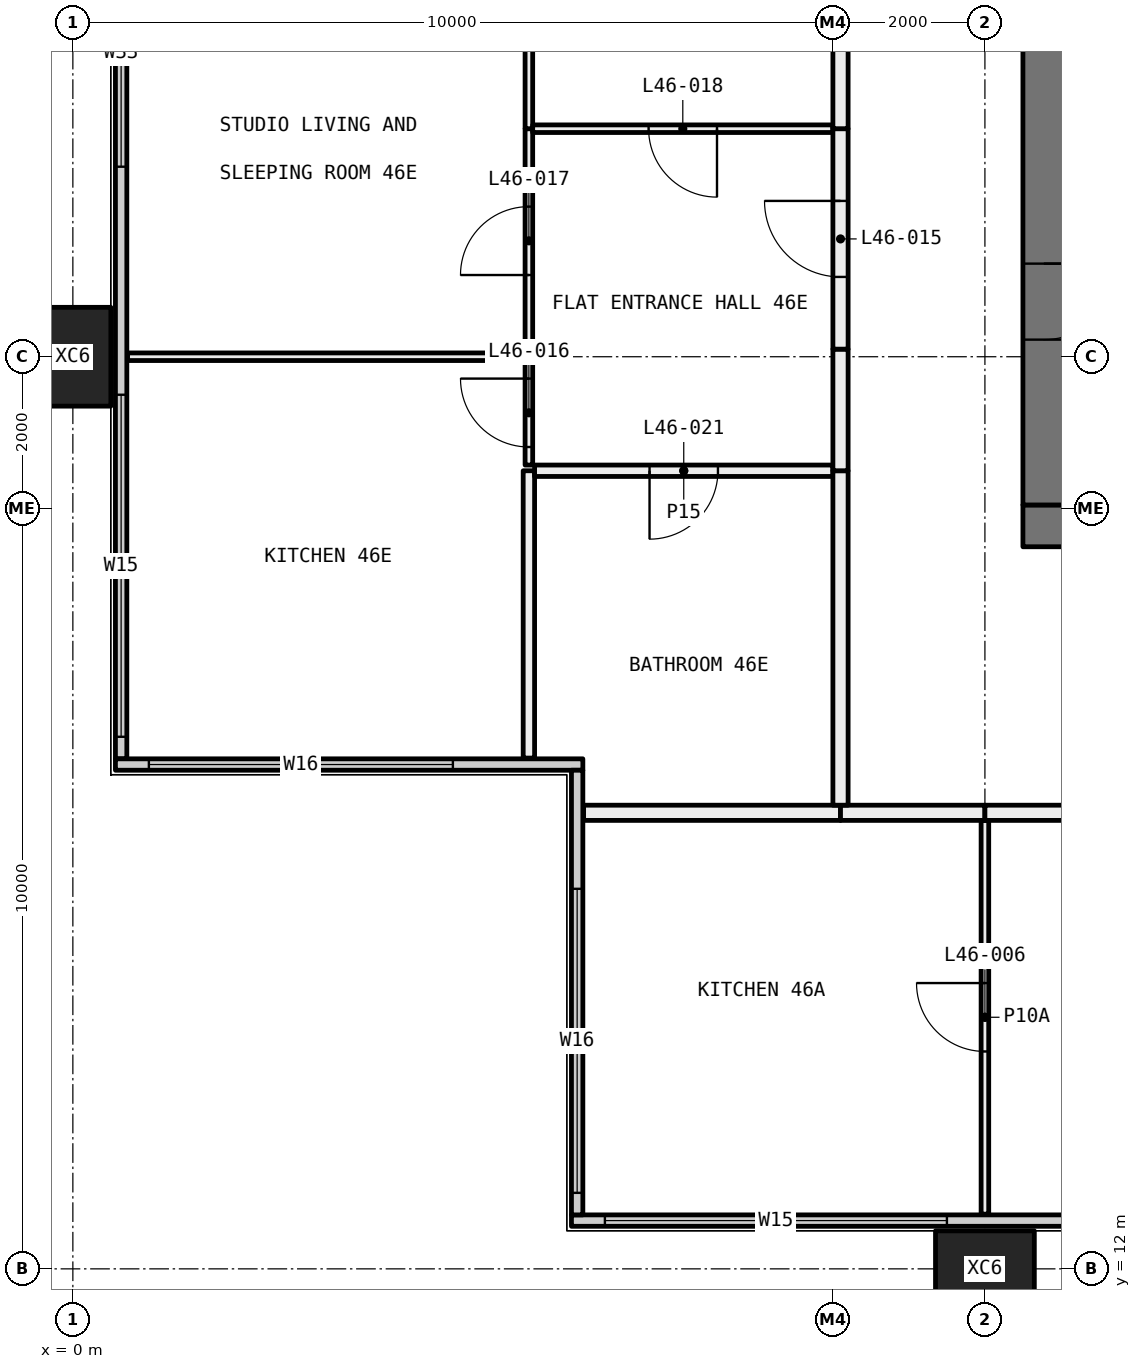
"""IFC4 building model, lengths in metres.
Left out: names, types, materials, properties, quantities, classifications, styles, units other than length and angle.
Written with IfcOpenShell. Run it as: python <this file> out.ifc"""

import sys

from ifc_helpers import new_model, si_unit, direction, frame, frame_2d, origin, origin_2d, place, context, subcontext, project, spatial, rectangle, hollow_rectangle, extrude, element, fill, save


model = new_model("IFC4")
c1 = context("Model", 3, precision=1e-05, world=origin(), true_north=direction((0.0, 1.0)))
c2 = subcontext(c1, "Body", "Model", "MODEL_VIEW")
j1 = project(units=[si_unit("LENGTHUNIT", "METRE"), si_unit("PLANEANGLEUNIT", "RADIAN")], contexts=[c1])
p1 = place(None, origin())
s1 = spatial("IfcSite", under=j1, at=p1, CompositionType="ELEMENT")
p2 = place(p1, origin())
s2 = spatial("IfcBuilding", under=s1, at=p2, CompositionType="ELEMENT")
p3 = place(p2, frame((0.0, 0.0, 175.5)))
s3 = spatial("IfcBuildingStorey", under=s2, at=p3, CompositionType="ELEMENT", Elevation=175.5)
for number, where, z_axis, x_axis in (
    (1, (0.0, 24.0, -0.4), (0.0, 0.0, 1.0), (0.0, 1.0, 0.0)),
    (2, (12.0, 12.0, -0.4), (0.0, 0.0, 1.0), (1.0, 0.0, 0.0)),
):
    element("IfcColumn", number, at=place(p3, frame(where, z_axis=z_axis, x_axis=x_axis)), inside=s3, PredefinedType="COLUMN", context=c2, shape_type="SweptSolid", body=[
        extrude(hollow_rectangle(XDim=1.3, YDim=1.0, WallThickness=0.05, at=origin_2d()), origin(), (0.0, 0.0, 1.0), 3.45),
    ])
p4 = place(p3, frame((6.56, 12.635, 0.0), z_axis=(0.0, 0.0, 1.0), x_axis=(1.0, 0.0, 0.0)))
e3 = element("IfcWall", 3, at=p4, inside=s3, PredefinedType="ELEMENTEDWALL", context=c2, shape_type="SweptSolid", body=[
    extrude(rectangle(XDim=46.88, YDim=0.15, at=frame_2d((23.44, 0.0))), origin(), (0.0, 0.0, 1.0), 3.05),
])
p5 = place(p4, frame((0.44, 0.0, 0.45)))
e4 = element("IfcOpeningElement", 4, at=p5, cuts=e3, PredefinedType="OPENING", context=c2, shape_type="SweptSolid", body=[
    extrude(rectangle(XDim=4.5, YDim=2.55, at=frame_2d((2.25, 1.275))), frame((0.0, 0.085, 0.0), z_axis=(0.0, -1.0, 0.0), x_axis=(1.0, 0.0, 0.0)), (0.0, 0.0, 1.0), 0.17),
])
p6 = place(p4, frame((7.94, 0.0, 0.45)))
e5 = element("IfcOpeningElement", 5, at=p6, cuts=e3, PredefinedType="OPENING", context=c2, shape_type="SweptSolid", body=[
    extrude(rectangle(XDim=3.0, YDim=2.55, at=frame_2d((1.5, 1.275))), frame((0.0, 0.085, 0.0), z_axis=(0.0, -1.0, 0.0), x_axis=(1.0, 0.0, 0.0)), (0.0, 0.0, 1.0), 0.17),
])
p7 = place(p4, frame((11.94, 0.0, 0.45)))
e6 = element("IfcOpeningElement", 6, at=p7, cuts=e3, PredefinedType="OPENING", context=c2, shape_type="SweptSolid", body=[
    extrude(rectangle(XDim=3.0, YDim=2.55, at=frame_2d((1.5, 1.275))), frame((0.0, 0.085, 0.0), z_axis=(0.0, -1.0, 0.0), x_axis=(1.0, 0.0, 0.0)), (0.0, 0.0, 1.0), 0.17),
])
p8 = place(p4, frame((19.94, 0.0, 0.45)))
e7 = element("IfcOpeningElement", 7, at=p8, cuts=e3, PredefinedType="OPENING", context=c2, shape_type="SweptSolid", body=[
    extrude(rectangle(XDim=3.0, YDim=2.55, at=frame_2d((1.5, 1.275))), frame((0.0, 0.085, 0.0), z_axis=(0.0, -1.0, 0.0), x_axis=(1.0, 0.0, 0.0)), (0.0, 0.0, 1.0), 0.17),
])
p9 = place(p4, frame((23.94, 0.0, 0.45)))
e8 = element("IfcOpeningElement", 8, at=p9, cuts=e3, PredefinedType="OPENING", context=c2, shape_type="SweptSolid", body=[
    extrude(rectangle(XDim=2.0, YDim=2.55, at=frame_2d((1.0, 1.275))), frame((0.0, 0.085, 0.0), z_axis=(0.0, -1.0, 0.0), x_axis=(1.0, 0.0, 0.0)), (0.0, 0.0, 1.0), 0.17),
])
p10 = place(p4, frame((31.94, 0.0, 0.45)))
e9 = element("IfcOpeningElement", 9, at=p10, cuts=e3, PredefinedType="OPENING", context=c2, shape_type="SweptSolid", body=[
    extrude(rectangle(XDim=3.0, YDim=2.55, at=frame_2d((1.5, 1.275))), frame((0.0, 0.085, 0.0), z_axis=(0.0, -1.0, 0.0), x_axis=(1.0, 0.0, 0.0)), (0.0, 0.0, 1.0), 0.17),
])
p11 = place(p4, frame((35.94, 0.0, 0.45)))
e10 = element("IfcOpeningElement", 10, at=p11, cuts=e3, PredefinedType="OPENING", context=c2, shape_type="SweptSolid", body=[
    extrude(rectangle(XDim=3.0, YDim=2.55, at=frame_2d((1.5, 1.275))), frame((0.0, 0.085, 0.0), z_axis=(0.0, -1.0, 0.0), x_axis=(1.0, 0.0, 0.0)), (0.0, 0.0, 1.0), 0.17),
])
p12 = place(p4, frame((41.94, 0.0, 0.45)))
e11 = element("IfcOpeningElement", 11, at=p12, cuts=e3, PredefinedType="OPENING", context=c2, shape_type="SweptSolid", body=[
    extrude(rectangle(XDim=4.5, YDim=2.55, at=frame_2d((2.25, 1.275))), frame((0.0, 0.085, 0.0), z_axis=(0.0, -1.0, 0.0), x_axis=(1.0, 0.0, 0.0)), (0.0, 0.0, 1.0), 0.17),
])
p13 = place(p3, frame((0.635, 18.71, 0.0), z_axis=(0.0, 0.0, 1.0), x_axis=(0.0, 1.0, 0.0)))
e12 = element("IfcWall", 12, at=p13, inside=s3, PredefinedType="ELEMENTEDWALL", context=c2, shape_type="SweptSolid", body=[
    extrude(rectangle(XDim=22.58, YDim=0.15, at=frame_2d((11.29, 0.0))), origin(), (0.0, 0.0, 1.0), 3.05),
])
p14 = place(p13, frame((0.29, 0.0, 0.45)))
e13 = element("IfcOpeningElement", 13, at=p14, cuts=e12, PredefinedType="OPENING", context=c2, shape_type="SweptSolid", body=[
    extrude(rectangle(XDim=4.5, YDim=2.55, at=frame_2d((2.25, 1.275))), frame((0.0, 0.085, 0.0), z_axis=(0.0, -1.0, 0.0), x_axis=(1.0, 0.0, 0.0)), (0.0, 0.0, 1.0), 0.17),
])
p15 = place(p13, frame((7.79, 0.0, 0.45)))
e14 = element("IfcOpeningElement", 14, at=p15, cuts=e12, PredefinedType="OPENING", context=c2, shape_type="SweptSolid", body=[
    extrude(rectangle(XDim=3.0, YDim=2.55, at=frame_2d((1.5, 1.275))), frame((0.0, 0.085, 0.0), z_axis=(0.0, -1.0, 0.0), x_axis=(1.0, 0.0, 0.0)), (0.0, 0.0, 1.0), 0.17),
])
p16 = place(p13, frame((11.79, 0.0, 0.45)))
e15 = element("IfcOpeningElement", 15, at=p16, cuts=e12, PredefinedType="OPENING", context=c2, shape_type="SweptSolid", body=[
    extrude(rectangle(XDim=2.0, YDim=2.55, at=frame_2d((1.0, 1.275))), frame((0.0, 0.085, 0.0), z_axis=(0.0, -1.0, 0.0), x_axis=(1.0, 0.0, 0.0)), (0.0, 0.0, 1.0), 0.17),
])
p17 = place(p13, frame((17.79, 0.0, 0.45)))
e16 = element("IfcOpeningElement", 16, at=p17, cuts=e12, PredefinedType="OPENING", context=c2, shape_type="SweptSolid", body=[
    extrude(rectangle(XDim=4.5, YDim=2.55, at=frame_2d((2.25, 1.275))), frame((0.0, 0.085, 0.0), z_axis=(0.0, -1.0, 0.0), x_axis=(1.0, 0.0, 0.0)), (0.0, 0.0, 1.0), 0.17),
])
p18 = place(p3, frame((0.56, 18.635, 0.0), z_axis=(0.0, 0.0, 1.0), x_axis=(1.0, 0.0, 0.0)))
e17 = element("IfcWall", 17, at=p18, inside=s3, PredefinedType="ELEMENTEDWALL", context=c2, shape_type="SweptSolid", body=[
    extrude(rectangle(XDim=6.15, YDim=0.15, at=frame_2d((3.075, 0.0))), origin(), (0.0, 0.0, 1.0), 3.05),
])
p19 = place(p18, frame((0.44, 0.0, 0.45)))
e18 = element("IfcOpeningElement", 18, at=p19, cuts=e17, PredefinedType="OPENING", context=c2, shape_type="SweptSolid", body=[
    extrude(rectangle(XDim=4.0, YDim=2.55, at=frame_2d((2.0, 1.275))), frame((0.0, 0.085, 0.0), z_axis=(0.0, -1.0, 0.0), x_axis=(1.0, 0.0, 0.0)), (0.0, 0.0, 1.0), 0.17),
])
p20 = place(p3, frame((6.635, 12.71, 0.0), z_axis=(0.0, 0.0, 1.0), x_axis=(0.0, 1.0, 0.0)))
e19 = element("IfcWall", 19, at=p20, inside=s3, PredefinedType="ELEMENTEDWALL", context=c2, shape_type="SweptSolid", body=[
    extrude(rectangle(XDim=5.85, YDim=0.15, at=frame_2d((2.925, 0.0))), origin(), (0.0, 0.0, 1.0), 3.05),
])
p21 = place(p20, frame((0.29, 0.0, 0.45)))
e20 = element("IfcOpeningElement", 20, at=p21, cuts=e19, PredefinedType="OPENING", context=c2, shape_type="SweptSolid", body=[
    extrude(rectangle(XDim=4.0, YDim=2.55, at=frame_2d((2.0, 1.275))), frame((0.0, 0.085, 0.0), z_axis=(0.0, -1.0, 0.0), x_axis=(1.0, 0.0, 0.0)), (0.0, 0.0, 1.0), 0.17),
])
p22 = place(p3, frame((12.0, 12.72, 0.0), z_axis=(0.0, 0.0, 1.0), x_axis=(0.0, 1.0, 0.0)))
e21 = element("IfcWall", 21, at=p22, inside=s3, PredefinedType="PARTITIONING", context=c2, shape_type="SweptSolid", body=[
    extrude(rectangle(XDim=5.18, YDim=0.1, at=frame_2d((2.59, 0.0))), origin(), (0.0, 0.0, 1.0), 3.05),
])
p23 = place(p22, frame((2.14, 0.0, 0.0)))
e22 = element("IfcOpeningElement", 22, at=p23, cuts=e21, PredefinedType="OPENING", context=c2, shape_type="SweptSolid", body=[
    extrude(rectangle(XDim=0.9, YDim=2.1, at=frame_2d((0.45, 1.05))), frame((0.0, 0.06, 0.0), z_axis=(0.0, -1.0, 0.0), x_axis=(1.0, 0.0, 0.0)), (0.0, 0.0, 1.0), 0.12),
])
p24 = place(p3, frame((10.1, 18.0, 0.0), z_axis=(0.0, 0.0, 1.0), x_axis=(-1.0, 0.0, 0.0)))
e23 = element("IfcWall", 23, at=p24, inside=s3, PredefinedType="PARTITIONING", context=c2, shape_type="SweptSolid", body=[
    extrude(rectangle(XDim=3.38, YDim=0.2, at=frame_2d((1.69, 0.0))), origin(), (0.0, 0.0, 1.0), 3.05),
])
p25 = place(p3, frame((12.0, 18.0, 0.0), z_axis=(0.0, 0.0, 1.0), x_axis=(-1.0, 0.0, 0.0)))
e24 = element("IfcWall", 24, at=p25, inside=s3, PredefinedType="PARTITIONING", context=c2, shape_type="SweptSolid", body=[
    extrude(rectangle(XDim=1.9, YDim=0.2, at=frame_2d((0.95, 0.0))), origin(), (0.0, 0.0, 1.0), 3.05),
])
p26 = place(p3, frame((18.0, 18.0, 0.0), z_axis=(0.0, 0.0, 1.0), x_axis=(-1.0, 0.0, 0.0)))
e25 = element("IfcWall", 25, at=p26, inside=s3, PredefinedType="PARTITIONING", context=c2, shape_type="SweptSolid", body=[
    extrude(rectangle(XDim=6.0, YDim=0.2, at=frame_2d((3.0, 0.0))), origin(), (0.0, 0.0, 1.0), 3.05),
])
p27 = place(p3, frame((6.0, 24.0, 0.0), z_axis=(0.0, 0.0, 1.0), x_axis=(-1.0, 0.0, 0.0)))
e26 = element("IfcWall", 26, at=p27, inside=s3, PredefinedType="PARTITIONING", context=c2, shape_type="SweptSolid", body=[
    extrude(rectangle(XDim=5.28, YDim=0.1, at=frame_2d((2.64, 0.0))), origin(), (0.0, 0.0, 1.0), 2.45),
])
p28 = place(p3, frame((6.0, 18.72, 0.0), z_axis=(0.0, 0.0, 1.0), x_axis=(0.0, 1.0, 0.0)))
e27 = element("IfcWall", 27, at=p28, inside=s3, PredefinedType="PARTITIONING", context=c2, shape_type="SweptSolid", body=[
    extrude(rectangle(XDim=3.78, YDim=0.15, at=frame_2d((1.89, 0.0))), origin(), (0.0, 0.0, 1.0), 3.05),
])
p29 = place(p3, frame((6.0, 22.575, 0.0), z_axis=(0.0, 0.0, 1.0), x_axis=(0.0, 1.0, 0.0)))
e28 = element("IfcWall", 28, at=p29, inside=s3, PredefinedType="PARTITIONING", context=c2, shape_type="SweptSolid", body=[
    extrude(rectangle(XDim=1.375, YDim=0.1, at=frame_2d((0.688, 0.0))), origin(), (0.0, 0.0, 1.0), 2.45),
])
p30 = place(p29, frame((0.238, 0.0, 0.0)))
e29 = element("IfcOpeningElement", 29, at=p30, cuts=e28, PredefinedType="OPENING", context=c2, shape_type="SweptSolid", body=[
    extrude(rectangle(XDim=0.9, YDim=2.1, at=frame_2d((0.45, 1.05))), frame((0.0, 0.06, 0.0), z_axis=(0.0, -1.0, 0.0), x_axis=(1.0, 0.0, 0.0)), (0.0, 0.0, 1.0), 0.12),
])
p31 = place(p3, frame((6.0, 24.05, 0.0), z_axis=(0.0, 0.0, 1.0), x_axis=(0.0, 1.0, 0.0)))
e30 = element("IfcWall", 30, at=p31, inside=s3, PredefinedType="PARTITIONING", context=c2, shape_type="SweptSolid", body=[
    extrude(rectangle(XDim=2.95, YDim=0.1, at=frame_2d((1.475, 0.0))), origin(), (0.0, 0.0, 1.0), 2.45),
])
p32 = place(p31, frame((1.025, 0.0, 0.0)))
e31 = element("IfcOpeningElement", 31, at=p32, cuts=e30, PredefinedType="OPENING", context=c2, shape_type="SweptSolid", body=[
    extrude(rectangle(XDim=0.9, YDim=2.1, at=frame_2d((0.45, 1.05))), frame((0.0, 0.06, 0.0), z_axis=(0.0, -1.0, 0.0), x_axis=(1.0, 0.0, 0.0)), (0.0, 0.0, 1.0), 0.12),
])
p33 = place(p3, frame((6.0, 27.0, 0.0), z_axis=(0.0, 0.0, 1.0), x_axis=(0.0, 1.0, 0.0)))
e32 = element("IfcWall", 32, at=p33, inside=s3, PredefinedType="PARTITIONING", context=c2, shape_type="SweptSolid", body=[
    extrude(rectangle(XDim=2.95, YDim=0.1, at=frame_2d((1.475, 0.0))), origin(), (0.0, 0.0, 1.0), 3.05),
])
p34 = place(p3, frame((10.0, 22.5, 0.0), z_axis=(0.0, 0.0, 1.0), x_axis=(-1.0, 0.0, 0.0)))
e33 = element("IfcWall", 33, at=p34, inside=s3, PredefinedType="PARTITIONING", context=c2, shape_type="SweptSolid", body=[
    extrude(rectangle(XDim=3.925, YDim=0.15, at=frame_2d((1.962, 0.0))), origin(), (0.0, 0.0, 1.0), 3.05),
])
p35 = place(p34, frame((1.512, 0.0, 0.0)))
e34 = element("IfcOpeningElement", 34, at=p35, cuts=e33, PredefinedType="OPENING", context=c2, shape_type="SweptSolid", body=[
    extrude(rectangle(XDim=0.9, YDim=2.1, at=frame_2d((0.45, 1.05))), frame((0.0, 0.085, 0.0), z_axis=(0.0, -1.0, 0.0), x_axis=(1.0, 0.0, 0.0)), (0.0, 0.0, 1.0), 0.17),
])
p36 = place(p3, frame((10.1, 18.1, 0.0), z_axis=(0.0, 0.0, 1.0), x_axis=(0.0, 1.0, 0.0)))
e35 = element("IfcWall", 35, at=p36, inside=s3, PredefinedType="PARTITIONING", context=c2, shape_type="SweptSolid", body=[
    extrude(rectangle(XDim=4.4, YDim=0.2, at=frame_2d((2.2, 0.0))), origin(), (0.0, 0.0, 1.0), 3.05),
])
p37 = place(p3, frame((10.0, 27.0, 0.0), z_axis=(0.0, 0.0, 1.0), x_axis=(-1.0, 0.0, 0.0)))
e36 = element("IfcWall", 36, at=p37, inside=s3, PredefinedType="PARTITIONING", context=c2, shape_type="SweptSolid", body=[
    extrude(rectangle(XDim=3.95, YDim=0.1, at=frame_2d((1.975, 0.0))), origin(), (0.0, 0.0, 1.0), 3.05),
])
p38 = place(p37, frame((1.525, 0.0, 0.0)))
e37 = element("IfcOpeningElement", 37, at=p38, cuts=e36, PredefinedType="OPENING", context=c2, shape_type="SweptSolid", body=[
    extrude(rectangle(XDim=0.9, YDim=2.1, at=frame_2d((0.45, 1.05))), frame((0.0, 0.06, 0.0), z_axis=(0.0, -1.0, 0.0), x_axis=(1.0, 0.0, 0.0)), (0.0, 0.0, 1.0), 0.12),
])
p39 = place(p3, frame((10.1, 22.5, 0.0), z_axis=(0.0, 0.0, 1.0), x_axis=(0.0, 1.0, 0.0)))
e38 = element("IfcWall", 38, at=p39, inside=s3, PredefinedType="PARTITIONING", context=c2, shape_type="SweptSolid", body=[
    extrude(rectangle(XDim=1.6, YDim=0.2, at=frame_2d((0.8, 0.0))), origin(), (0.0, 0.0, 1.0), 2.45),
])
p40 = place(p3, frame((10.1, 24.1, 0.0), z_axis=(0.0, 0.0, 1.0), x_axis=(0.0, 1.0, 0.0)))
e39 = element("IfcWall", 39, at=p40, inside=s3, PredefinedType="PARTITIONING", context=c2, shape_type="SweptSolid", body=[
    extrude(rectangle(XDim=2.9, YDim=0.2, at=frame_2d((1.45, 0.0))), origin(), (0.0, 0.0, 1.0), 3.05),
])
p41 = place(p40, frame((0.95, 0.0, 0.0)))
e40 = element("IfcOpeningElement", 40, at=p41, cuts=e39, PredefinedType="OPENING", context=c2, shape_type="SweptSolid", body=[
    extrude(rectangle(XDim=1.0, YDim=2.1, at=frame_2d((0.5, 1.05))), frame((0.0, 0.11, 0.0), z_axis=(0.0, -1.0, 0.0), x_axis=(1.0, 0.0, 0.0)), (0.0, 0.0, 1.0), 0.22),
])
p42 = place(p3, frame((10.1, 27.0, 0.0), z_axis=(0.0, 0.0, 1.0), x_axis=(0.0, 1.0, 0.0)))
e41 = element("IfcWall", 41, at=p42, inside=s3, PredefinedType="PARTITIONING", context=c2, shape_type="SweptSolid", body=[
    extrude(rectangle(XDim=9.1, YDim=0.2, at=frame_2d((4.55, 0.0))), origin(), (0.0, 0.0, 1.0), 2.45),
])
p43 = place(p3, frame((12.5, 21.775, 0.0), z_axis=(0.0, 0.0, 1.0), x_axis=(1.0, 0.0, 0.0)))
e42 = element("IfcWall", 42, at=p43, inside=s3, PredefinedType="SHEAR", context=c2, shape_type="SweptSolid", body=[
    extrude(rectangle(XDim=11.0, YDim=0.55, at=frame_2d((5.5, 0.0))), origin(), (0.0, 0.0, 1.0), 3.05),
])
p44 = place(p3, frame((12.775, 22.05, 0.0), z_axis=(0.0, 0.0, 1.0), x_axis=(0.0, 1.0, 0.0)))
e43 = element("IfcWall", 43, at=p44, inside=s3, PredefinedType="SHEAR", context=c2, shape_type="SweptSolid", body=[
    extrude(rectangle(XDim=15.9, YDim=0.55, at=frame_2d((7.95, 0.0))), origin(), (0.0, 0.0, 1.0), 3.05),
])
p45 = place(p44, frame((8.4, 0.0, 0.0)))
e44 = element("IfcOpeningElement", 44, at=p45, cuts=e43, PredefinedType="OPENING", context=c2, shape_type="SweptSolid", body=[
    extrude(rectangle(XDim=1.6, YDim=2.1, at=frame_2d((0.8, 1.05))), frame((0.0, 0.285, 0.0), z_axis=(0.0, -1.0, 0.0), x_axis=(1.0, 0.0, 0.0)), (0.0, 0.0, 1.0), 0.57),
])
p46 = place(p44, frame((2.175, 0.0, 0.0)))
e45 = element("IfcOpeningElement", 45, at=p46, cuts=e43, PredefinedType="OPENING", context=c2, shape_type="SweptSolid", body=[
    extrude(rectangle(XDim=1.0, YDim=2.1, at=frame_2d((0.5, 1.05))), frame((0.0, 0.285, 0.0), z_axis=(0.0, -1.0, 0.0), x_axis=(1.0, 0.0, 0.0)), (0.0, 0.0, 1.0), 0.57),
])
p47 = place(p5, origin())
e46 = element("IfcWindow", 46, at=p47, inside=s3, PartitioningType="SINGLE_PANEL", PredefinedType="WINDOW", context=c2, shape_type="SweptSolid", body=[
    extrude(rectangle(XDim=4.5, YDim=2.55, at=frame_2d((2.25, 1.275))), frame((0.0, 0.03, 0.0), z_axis=(0.0, -1.0, 0.0), x_axis=(1.0, 0.0, 0.0)), (0.0, 0.0, 1.0), 0.06),
])
fill(e4, e46)
p48 = place(p14, origin())
e47 = element("IfcWindow", 47, at=p48, inside=s3, PartitioningType="SINGLE_PANEL", PredefinedType="WINDOW", context=c2, shape_type="SweptSolid", body=[
    extrude(rectangle(XDim=4.5, YDim=2.55, at=frame_2d((2.25, 1.275))), frame((0.0, 0.03, 0.0), z_axis=(0.0, -1.0, 0.0), x_axis=(1.0, 0.0, 0.0)), (0.0, 0.0, 1.0), 0.06),
])
fill(e13, e47)
p49 = place(p15, origin())
e48 = element("IfcWindow", 48, at=p49, inside=s3, PartitioningType="SINGLE_PANEL", PredefinedType="WINDOW", context=c2, shape_type="SweptSolid", body=[
    extrude(rectangle(XDim=3.0, YDim=2.55, at=frame_2d((1.5, 1.275))), frame((0.0, 0.03, 0.0), z_axis=(0.0, -1.0, 0.0), x_axis=(1.0, 0.0, 0.0)), (0.0, 0.0, 1.0), 0.06),
])
fill(e14, e48)
p50 = place(p19, origin())
e49 = element("IfcWindow", 49, at=p50, inside=s3, PartitioningType="SINGLE_PANEL", PredefinedType="WINDOW", context=c2, shape_type="SweptSolid", body=[
    extrude(rectangle(XDim=4.0, YDim=2.55, at=frame_2d((2.0, 1.275))), frame((0.0, 0.03, 0.0), z_axis=(0.0, -1.0, 0.0), x_axis=(1.0, 0.0, 0.0)), (0.0, 0.0, 1.0), 0.06),
])
fill(e18, e49)
p51 = place(p21, origin())
e50 = element("IfcWindow", 50, at=p51, inside=s3, PartitioningType="SINGLE_PANEL", PredefinedType="WINDOW", context=c2, shape_type="SweptSolid", body=[
    extrude(rectangle(XDim=4.0, YDim=2.55, at=frame_2d((2.0, 1.275))), frame((0.0, 0.03, 0.0), z_axis=(0.0, -1.0, 0.0), x_axis=(1.0, 0.0, 0.0)), (0.0, 0.0, 1.0), 0.06),
])
fill(e20, e50)
p52 = place(p23, origin())
e51 = element("IfcDoor", 51, at=p52, inside=s3, OperationType="SINGLE_SWING_LEFT", PredefinedType="DOOR", context=c2, shape_type="SweptSolid", body=[
    extrude(rectangle(XDim=0.9, YDim=2.1, at=frame_2d((0.45, 1.05))), frame((0.0, 0.025, 0.0), z_axis=(0.0, -1.0, 0.0), x_axis=(1.0, 0.0, 0.0)), (0.0, 0.0, 1.0), 0.05),
])
fill(e22, e51)
p53 = place(p41, origin())
e52 = element("IfcDoor", 52, at=p53, inside=s3, OperationType="SINGLE_SWING_LEFT", PredefinedType="DOOR", context=c2, shape_type="SweptSolid", body=[
    extrude(rectangle(XDim=1.0, YDim=2.1, at=frame_2d((0.5, 1.05))), frame((0.0, 0.025, 0.0), z_axis=(0.0, -1.0, 0.0), x_axis=(1.0, 0.0, 0.0)), (0.0, 0.0, 1.0), 0.05),
])
fill(e40, e52)
p54 = place(p30, origin())
e53 = element("IfcDoor", 53, at=p54, inside=s3, OperationType="SINGLE_SWING_LEFT", PredefinedType="DOOR", context=c2, shape_type="SweptSolid", body=[
    extrude(rectangle(XDim=0.9, YDim=2.1, at=frame_2d((0.45, 1.05))), frame((0.0, 0.025, 0.0), z_axis=(0.0, -1.0, 0.0), x_axis=(1.0, 0.0, 0.0)), (0.0, 0.0, 1.0), 0.05),
])
fill(e29, e53)
p55 = place(p32, origin())
e54 = element("IfcDoor", 54, at=p55, inside=s3, OperationType="SINGLE_SWING_RIGHT", PredefinedType="DOOR", context=c2, shape_type="SweptSolid", body=[
    extrude(rectangle(XDim=0.9, YDim=2.1, at=frame_2d((0.45, 1.05))), frame((0.0, 0.025, 0.0), z_axis=(0.0, -1.0, 0.0), x_axis=(1.0, 0.0, 0.0)), (0.0, 0.0, 1.0), 0.05),
])
fill(e31, e54)
p56 = place(p38, origin())
e55 = element("IfcDoor", 55, at=p56, inside=s3, OperationType="SINGLE_SWING_RIGHT", PredefinedType="DOOR", context=c2, shape_type="SweptSolid", body=[
    extrude(rectangle(XDim=0.9, YDim=2.1, at=frame_2d((0.45, 1.05))), frame((0.0, 0.025, 0.0), z_axis=(0.0, -1.0, 0.0), x_axis=(1.0, 0.0, 0.0)), (0.0, 0.0, 1.0), 0.05),
])
fill(e37, e55)
p57 = place(p35, origin())
e56 = element("IfcDoor", 56, at=p57, inside=s3, OperationType="SINGLE_SWING_LEFT", PredefinedType="DOOR", context=c2, shape_type="SweptSolid", body=[
    extrude(rectangle(XDim=0.9, YDim=2.1, at=frame_2d((0.45, 1.05))), frame((0.0, 0.025, 0.0), z_axis=(0.0, -1.0, 0.0), x_axis=(1.0, 0.0, 0.0)), (0.0, 0.0, 1.0), 0.05),
])
fill(e34, e56)
p58 = place(p46, frame((1.0, 0.0, 0.0), x_axis=(-1.0, 0.0, 0.0)))
e57 = element("IfcDoor", 57, at=p58, inside=s3, OperationType="SINGLE_SWING_RIGHT", PredefinedType="DOOR", context=c2, shape_type="SweptSolid", body=[
    extrude(rectangle(XDim=1.0, YDim=2.1, at=frame_2d((0.5, 1.05))), frame((0.0, 0.025, 0.0), z_axis=(0.0, -1.0, 0.0), x_axis=(1.0, 0.0, 0.0)), (0.0, 0.0, 1.0), 0.05),
])
fill(e45, e57)
save(model, sys.argv[1])
